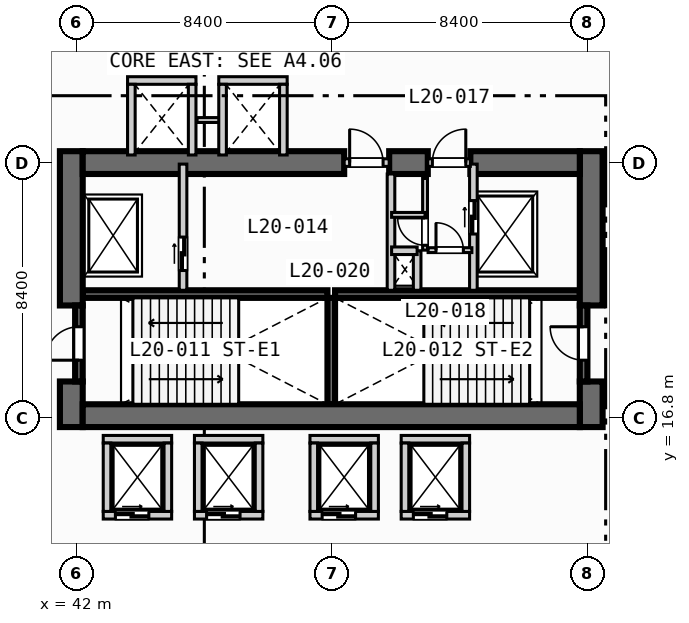
"""IFC4 building model, lengths in metres.
Left out: names, types, materials, properties, quantities, classifications, styles, units other than length and angle.
Written with IfcOpenShell. Run it as: python <this file> out.ifc"""

import sys

from ifc_helpers import new_model, si_unit, direction, frame, frame_2d, origin, place, context, subcontext, project, spatial, rectangle, extrude, element, fill, save


model = new_model("IFC4")
c1 = context("Model", 3, precision=1e-05, world=origin(), true_north=direction((0.0, 1.0)))
c2 = subcontext(c1, "Body", "Model", "MODEL_VIEW")
j1 = project(units=[si_unit("LENGTHUNIT", "METRE"), si_unit("PLANEANGLEUNIT", "RADIAN")], contexts=[c1])
p1 = place(None, origin())
s1 = spatial("IfcSite", under=j1, at=p1, CompositionType="ELEMENT")
p2 = place(p1, origin())
s2 = spatial("IfcBuilding", under=s1, at=p2, CompositionType="ELEMENT")
p3 = place(p2, frame((0.0, 0.0, 85.2)))
s3 = spatial("IfcBuildingStorey", under=s2, at=p3, CompositionType="ELEMENT", Elevation=85.2)
for number, where, z_axis, x_axis in (
    (1, (42.2, 20.875, 0.0), (0.0, 0.0, 1.0), (1.0, 0.0, 0.0)),
    (2, (50.5, 20.875, 0.0), (0.0, 0.0, 1.0), (1.0, 0.0, 0.0)),
):
    element("IfcWall", number, at=place(p3, frame(where, z_axis=z_axis, x_axis=x_axis)), inside=s3, PredefinedType="SOLIDWALL", context=c2, shape_type="SweptSolid", body=[
        extrude(rectangle(XDim=8.05, YDim=0.25, at=frame_2d((4.025, 0.0))), origin(), (0.0, 0.0, 1.0), 4.15),
    ])
p4 = place(p3, frame((50.375, 17.25, 0.0), z_axis=(0.0, 0.0, 1.0), x_axis=(0.0, 1.0, 0.0)))
e3 = element("IfcWall", 3, at=p4, inside=s3, PredefinedType="SOLIDWALL", context=c2, shape_type="SweptSolid", body=[
    extrude(rectangle(XDim=3.5, YDim=0.25, at=frame_2d((1.75, 0.0))), origin(), (0.0, 0.0, 1.0), 4.15),
])
p5 = place(p3, frame((41.825, 16.5, 0.0), z_axis=(0.0, 0.0, 1.0), x_axis=(0.0, 1.0, 0.0)))
e4 = element("IfcWall", 4, at=p5, inside=s3, PredefinedType="SHEAR", context=c2, shape_type="SweptSolid", body=[
    extrude(rectangle(XDim=1.5, YDim=0.75, at=frame_2d((0.75, 0.0))), origin(), (0.0, 0.0, 1.0), 4.15),
])
p6 = place(p3, frame((41.825, 20.5, 0.0), z_axis=(0.0, 0.0, 1.0), x_axis=(0.0, 1.0, 0.0)))
e5 = element("IfcWall", 5, at=p6, inside=s3, PredefinedType="SHEAR", context=c2, shape_type="SweptSolid", body=[
    extrude(rectangle(XDim=5.075, YDim=0.75, at=frame_2d((2.538, 0.0))), origin(), (0.0, 0.0, 1.0), 4.15),
])
p7 = place(p3, frame((58.925, 16.5, 0.0), z_axis=(0.0, 0.0, 1.0), x_axis=(0.0, 1.0, 0.0)))
e6 = element("IfcWall", 6, at=p7, inside=s3, PredefinedType="SHEAR", context=c2, shape_type="SweptSolid", body=[
    extrude(rectangle(XDim=1.5, YDim=0.75, at=frame_2d((0.75, 0.0))), origin(), (0.0, 0.0, 1.0), 4.15),
])
p8 = place(p3, frame((58.925, 20.5, 0.0), z_axis=(0.0, 0.0, 1.0), x_axis=(0.0, 1.0, 0.0)))
e7 = element("IfcWall", 7, at=p8, inside=s3, PredefinedType="SHEAR", context=c2, shape_type="SweptSolid", body=[
    extrude(rectangle(XDim=5.075, YDim=0.75, at=frame_2d((2.538, 0.0))), origin(), (0.0, 0.0, 1.0), 4.15),
])
p9 = place(p3, frame((42.2, 16.875, 0.0), z_axis=(0.0, 0.0, 1.0), x_axis=(1.0, 0.0, 0.0)))
e8 = element("IfcWall", 8, at=p9, inside=s3, PredefinedType="SHEAR", context=c2, shape_type="SweptSolid", body=[
    extrude(rectangle(XDim=16.35, YDim=0.75, at=frame_2d((8.175, 0.0))), origin(), (0.0, 0.0, 1.0), 4.15),
])
p10 = place(p3, frame((42.2, 25.2, 0.0), z_axis=(0.0, 0.0, 1.0), x_axis=(1.0, 0.0, 0.0)))
e9 = element("IfcWall", 9, at=p10, inside=s3, PredefinedType="SHEAR", context=c2, shape_type="SweptSolid", body=[
    extrude(rectangle(XDim=8.6, YDim=0.75, at=frame_2d((4.3, 0.0))), origin(), (0.0, 0.0, 1.0), 4.15),
])
p11 = place(p3, frame((52.28, 25.2, 0.0), z_axis=(0.0, 0.0, 1.0), x_axis=(1.0, 0.0, 0.0)))
e10 = element("IfcWall", 10, at=p11, inside=s3, PredefinedType="SHEAR", context=c2, shape_type="SweptSolid", body=[
    extrude(rectangle(XDim=1.27, YDim=0.75, at=frame_2d((0.635, 0.0))), origin(), (0.0, 0.0, 1.0), 4.15),
])
p12 = place(p3, frame((54.95, 25.2, 0.0), z_axis=(0.0, 0.0, 1.0), x_axis=(1.0, 0.0, 0.0)))
e11 = element("IfcWall", 11, at=p12, inside=s3, PredefinedType="SHEAR", context=c2, shape_type="SweptSolid", body=[
    extrude(rectangle(XDim=3.6, YDim=0.75, at=frame_2d((1.8, 0.0))), origin(), (0.0, 0.0, 1.0), 4.15),
])
p13 = place(p3, frame((42.075, 18.0, 0.0), z_axis=(0.0, 0.0, 1.0), x_axis=(0.0, 1.0, 0.0)))
e12 = element("IfcWall", 12, at=p13, inside=s3, PredefinedType="SOLIDWALL", context=c2, shape_type="SweptSolid", body=[
    extrude(rectangle(XDim=2.5, YDim=0.25, at=frame_2d((1.25, 0.0))), origin(), (0.0, 0.0, 1.0), 4.15),
])
p14 = place(p13, frame((0.7, 0.0, 0.0)))
e13 = element("IfcOpeningElement", 13, at=p14, cuts=e12, PredefinedType="OPENING", context=c2, shape_type="SweptSolid", body=[
    extrude(rectangle(XDim=1.1, YDim=2.15, at=frame_2d((0.55, 1.075))), frame((0.0, 0.135, 0.0), z_axis=(0.0, -1.0, 0.0), x_axis=(1.0, 0.0, 0.0)), (0.0, 0.0, 1.0), 0.27),
])
p15 = place(p3, frame((58.675, 18.0, 0.0), z_axis=(0.0, 0.0, 1.0), x_axis=(0.0, 1.0, 0.0)))
e14 = element("IfcWall", 14, at=p15, inside=s3, PredefinedType="SOLIDWALL", context=c2, shape_type="SweptSolid", body=[
    extrude(rectangle(XDim=2.5, YDim=0.25, at=frame_2d((1.25, 0.0))), origin(), (0.0, 0.0, 1.0), 4.15),
])
p16 = place(p15, frame((0.7, 0.0, 0.0)))
e15 = element("IfcOpeningElement", 15, at=p16, cuts=e14, PredefinedType="OPENING", context=c2, shape_type="SweptSolid", body=[
    extrude(rectangle(XDim=1.1, YDim=2.15, at=frame_2d((0.55, 1.075))), frame((0.0, 0.135, 0.0), z_axis=(0.0, -1.0, 0.0), x_axis=(1.0, 0.0, 0.0)), (0.0, 0.0, 1.0), 0.27),
])
p17 = place(p3, frame((45.5, 21.0, 0.0), z_axis=(0.0, 0.0, 1.0), x_axis=(0.0, 1.0, 0.0)))
e16 = element("IfcWall", 16, at=p17, inside=s3, PredefinedType="SOLIDWALL", context=c2, shape_type="SweptSolid", body=[
    extrude(rectangle(XDim=4.15, YDim=0.25, at=frame_2d((2.075, 0.0))), origin(), (0.0, 0.0, 1.0), 4.15),
])
p18 = place(p17, frame((0.65, 0.0, 0.0)))
e17 = element("IfcOpeningElement", 17, at=p18, cuts=e16, PredefinedType="OPENING", context=c2, shape_type="SweptSolid", body=[
    extrude(rectangle(XDim=1.1, YDim=2.15, at=frame_2d((0.55, 1.075))), frame((0.0, 0.135, 0.0), z_axis=(0.0, -1.0, 0.0), x_axis=(1.0, 0.0, 0.0)), (0.0, 0.0, 1.0), 0.27),
])
p19 = place(p3, frame((50.8, 25.2, 0.0), z_axis=(0.0, 0.0, 1.0), x_axis=(1.0, 0.0, 0.0)))
e18 = element("IfcWall", 18, at=p19, inside=s3, PredefinedType="SOLIDWALL", context=c2, shape_type="SweptSolid", body=[
    extrude(rectangle(XDim=1.48, YDim=0.25, at=frame_2d((0.74, 0.0))), origin(), (0.0, 0.0, 1.0), 4.15),
])
p20 = place(p19, frame((0.18, 0.0, 0.0)))
e19 = element("IfcOpeningElement", 19, at=p20, cuts=e18, PredefinedType="OPENING", context=c2, shape_type="SweptSolid", body=[
    extrude(rectangle(XDim=1.1, YDim=2.15, at=frame_2d((0.55, 1.075))), frame((0.0, 0.135, 0.0), z_axis=(0.0, -1.0, 0.0), x_axis=(1.0, 0.0, 0.0)), (0.0, 0.0, 1.0), 0.27),
])
p21 = place(p3, frame((52.34, 21.0, 0.0), z_axis=(0.0, 0.0, 1.0), x_axis=(0.0, 1.0, 0.0)))
e20 = element("IfcWall", 20, at=p21, inside=s3, PredefinedType="SOLIDWALL", context=c2, shape_type="SweptSolid", body=[
    extrude(rectangle(XDim=3.825, YDim=0.25, at=frame_2d((1.913, 0.0))), origin(), (0.0, 0.0, 1.0), 4.15),
])
p22 = place(p3, frame((55.05, 21.0, 0.0), z_axis=(0.0, 0.0, 1.0), x_axis=(0.0, 1.0, 0.0)))
e21 = element("IfcWall", 21, at=p22, inside=s3, PredefinedType="SOLIDWALL", context=c2, shape_type="SweptSolid", body=[
    extrude(rectangle(XDim=4.15, YDim=0.25, at=frame_2d((2.075, 0.0))), origin(), (0.0, 0.0, 1.0), 4.15),
])
p23 = place(p22, frame((1.85, 0.0, 0.0)))
e22 = element("IfcOpeningElement", 22, at=p23, cuts=e21, PredefinedType="OPENING", context=c2, shape_type="SweptSolid", body=[
    extrude(rectangle(XDim=1.1, YDim=2.15, at=frame_2d((0.55, 1.075))), frame((0.0, 0.135, 0.0), z_axis=(0.0, -1.0, 0.0), x_axis=(1.0, 0.0, 0.0)), (0.0, 0.0, 1.0), 0.27),
])
p24 = place(p3, frame((53.55, 25.2, 0.0), z_axis=(0.0, 0.0, 1.0), x_axis=(1.0, 0.0, 0.0)))
e23 = element("IfcWall", 23, at=p24, inside=s3, PredefinedType="SOLIDWALL", context=c2, shape_type="SweptSolid", body=[
    extrude(rectangle(XDim=1.4, YDim=0.25, at=frame_2d((0.7, 0.0))), origin(), (0.0, 0.0, 1.0), 4.15),
])
p25 = place(p24, frame((0.15, 0.0, 0.0)))
e24 = element("IfcOpeningElement", 24, at=p25, cuts=e23, PredefinedType="OPENING", context=c2, shape_type="SweptSolid", body=[
    extrude(rectangle(XDim=1.1, YDim=2.15, at=frame_2d((0.55, 1.075))), frame((0.0, 0.135, 0.0), z_axis=(0.0, -1.0, 0.0), x_axis=(1.0, 0.0, 0.0)), (0.0, 0.0, 1.0), 0.27),
])
p26 = place(p3, frame((53.2, 21.0, 0.0), z_axis=(0.0, 0.0, 1.0), x_axis=(0.0, 1.0, 0.0)))
e25 = element("IfcWall", 25, at=p26, inside=s3, PredefinedType="SOLIDWALL", context=c2, shape_type="SweptSolid", body=[
    extrude(rectangle(XDim=1.3, YDim=0.25, at=frame_2d((0.65, 0.0))), origin(), (0.0, 0.0, 1.0), 4.15),
])
p27 = place(p3, frame((52.36, 22.3, 0.0), z_axis=(0.0, 0.0, 1.0), x_axis=(1.0, 0.0, 0.0)))
e26 = element("IfcWall", 26, at=p27, inside=s3, PredefinedType="SOLIDWALL", context=c2, shape_type="SweptSolid", body=[
    extrude(rectangle(XDim=0.84, YDim=0.25, at=frame_2d((0.42, 0.0))), origin(), (0.0, 0.0, 1.0), 4.15),
])
p28 = place(p3, frame((53.56, 22.32, 0.0), z_axis=(0.0, 0.0, 1.0), x_axis=(1.0, 0.0, 0.0)))
e27 = element("IfcWall", 27, at=p28, inside=s3, PredefinedType="PARTITIONING", context=c2, shape_type="SweptSolid", body=[
    extrude(rectangle(XDim=1.44, YDim=0.16, at=frame_2d((0.72, 0.0))), origin(), (0.0, 0.0, 1.0), 4.15),
])
p29 = place(p28, frame((0.26, 0.0, 0.0)))
e28 = element("IfcOpeningElement", 28, at=p29, cuts=e27, PredefinedType="OPENING", context=c2, shape_type="SweptSolid", body=[
    extrude(rectangle(XDim=0.9, YDim=2.1, at=frame_2d((0.45, 1.05))), frame((0.0, 0.09, 0.0), z_axis=(0.0, -1.0, 0.0), x_axis=(1.0, 0.0, 0.0)), (0.0, 0.0, 1.0), 0.18),
])
p30 = place(p3, frame((53.46, 22.32, 0.0), z_axis=(0.0, 0.0, 1.0), x_axis=(0.0, 1.0, 0.0)))
e29 = element("IfcWall", 29, at=p30, inside=s3, PredefinedType="PARTITIONING", context=c2, shape_type="SweptSolid", body=[
    extrude(rectangle(XDim=2.36, YDim=0.16, at=frame_2d((1.18, 0.0))), origin(), (0.0, 0.0, 1.0), 4.15),
])
p31 = place(p30, frame((0.16, 0.0, 0.0)))
e30 = element("IfcOpeningElement", 30, at=p31, cuts=e29, PredefinedType="OPENING", context=c2, shape_type="SweptSolid", body=[
    extrude(rectangle(XDim=0.9, YDim=2.1, at=frame_2d((0.45, 1.05))), frame((0.0, 0.09, 0.0), z_axis=(0.0, -1.0, 0.0), x_axis=(1.0, 0.0, 0.0)), (0.0, 0.0, 1.0), 0.18),
])
p32 = place(p3, frame((52.36, 23.48, 0.0), z_axis=(0.0, 0.0, 1.0), x_axis=(1.0, 0.0, 0.0)))
e31 = element("IfcWall", 31, at=p32, inside=s3, PredefinedType="PARTITIONING", context=c2, shape_type="SweptSolid", body=[
    extrude(rectangle(XDim=1.1, YDim=0.16, at=frame_2d((0.55, 0.0))), origin(), (0.0, 0.0, 1.0), 4.15),
])
p33 = place(p3, frame((42.875, 13.6, 0.0), z_axis=(0.0, 0.0, 1.0), x_axis=(1.0, 0.0, 0.0)))
e32 = element("IfcWall", 32, at=p33, inside=s3, PredefinedType="SOLIDWALL", context=c2, shape_type="SweptSolid", body=[
    extrude(rectangle(XDim=2.25, YDim=0.25, at=frame_2d((1.125, 0.0))), origin(), (0.0, 0.0, 1.0), 4.15),
])
p34 = place(p33, frame((0.4, 0.0, 0.0)))
e33 = element("IfcOpeningElement", 33, at=p34, cuts=e32, PredefinedType="OPENING", context=c2, shape_type="SweptSolid", body=[
    extrude(rectangle(XDim=1.1, YDim=2.15, at=frame_2d((0.55, 1.075))), frame((0.0, 0.135, 0.0), z_axis=(0.0, -1.0, 0.0), x_axis=(1.0, 0.0, 0.0)), (0.0, 0.0, 1.0), 0.27),
])
for number, where, z_axis, x_axis in (
    (34, (42.875, 16.1, 0.0), (0.0, 0.0, 1.0), (1.0, 0.0, 0.0)),
    (35, (43.0, 13.725, 0.0), (0.0, 0.0, 1.0), (0.0, 1.0, 0.0)),
    (36, (45.0, 13.725, 0.0), (0.0, 0.0, 1.0), (0.0, 1.0, 0.0)),
):
    element("IfcWall", number, at=place(p3, frame(where, z_axis=z_axis, x_axis=x_axis)), inside=s3, PredefinedType="SOLIDWALL", context=c2, shape_type="SweptSolid", body=[
        extrude(rectangle(XDim=2.25, YDim=0.25, at=frame_2d((1.125, 0.0))), origin(), (0.0, 0.0, 1.0), 4.15),
    ])
p35 = place(p3, frame((45.875, 13.6, 0.0), z_axis=(0.0, 0.0, 1.0), x_axis=(1.0, 0.0, 0.0)))
e37 = element("IfcWall", 37, at=p35, inside=s3, PredefinedType="SOLIDWALL", context=c2, shape_type="SweptSolid", body=[
    extrude(rectangle(XDim=2.25, YDim=0.25, at=frame_2d((1.125, 0.0))), origin(), (0.0, 0.0, 1.0), 4.15),
])
p36 = place(p35, frame((0.4, 0.0, 0.0)))
e38 = element("IfcOpeningElement", 38, at=p36, cuts=e37, PredefinedType="OPENING", context=c2, shape_type="SweptSolid", body=[
    extrude(rectangle(XDim=1.1, YDim=2.15, at=frame_2d((0.55, 1.075))), frame((0.0, 0.135, 0.0), z_axis=(0.0, -1.0, 0.0), x_axis=(1.0, 0.0, 0.0)), (0.0, 0.0, 1.0), 0.27),
])
for number, where, z_axis, x_axis in (
    (39, (45.875, 16.1, 0.0), (0.0, 0.0, 1.0), (1.0, 0.0, 0.0)),
    (40, (46.0, 13.725, 0.0), (0.0, 0.0, 1.0), (0.0, 1.0, 0.0)),
    (41, (48.0, 13.725, 0.0), (0.0, 0.0, 1.0), (0.0, 1.0, 0.0)),
):
    element("IfcWall", number, at=place(p3, frame(where, z_axis=z_axis, x_axis=x_axis)), inside=s3, PredefinedType="SOLIDWALL", context=c2, shape_type="SweptSolid", body=[
        extrude(rectangle(XDim=2.25, YDim=0.25, at=frame_2d((1.125, 0.0))), origin(), (0.0, 0.0, 1.0), 4.15),
    ])
p37 = place(p3, frame((49.675, 13.6, 0.0), z_axis=(0.0, 0.0, 1.0), x_axis=(1.0, 0.0, 0.0)))
e42 = element("IfcWall", 42, at=p37, inside=s3, PredefinedType="SOLIDWALL", context=c2, shape_type="SweptSolid", body=[
    extrude(rectangle(XDim=2.25, YDim=0.25, at=frame_2d((1.125, 0.0))), origin(), (0.0, 0.0, 1.0), 4.15),
])
p38 = place(p37, frame((0.4, 0.0, 0.0)))
e43 = element("IfcOpeningElement", 43, at=p38, cuts=e42, PredefinedType="OPENING", context=c2, shape_type="SweptSolid", body=[
    extrude(rectangle(XDim=1.1, YDim=2.15, at=frame_2d((0.55, 1.075))), frame((0.0, 0.135, 0.0), z_axis=(0.0, -1.0, 0.0), x_axis=(1.0, 0.0, 0.0)), (0.0, 0.0, 1.0), 0.27),
])
for number, where, z_axis, x_axis in (
    (44, (49.675, 16.1, 0.0), (0.0, 0.0, 1.0), (1.0, 0.0, 0.0)),
    (45, (49.8, 13.725, 0.0), (0.0, 0.0, 1.0), (0.0, 1.0, 0.0)),
    (46, (51.8, 13.725, 0.0), (0.0, 0.0, 1.0), (0.0, 1.0, 0.0)),
):
    element("IfcWall", number, at=place(p3, frame(where, z_axis=z_axis, x_axis=x_axis)), inside=s3, PredefinedType="SOLIDWALL", context=c2, shape_type="SweptSolid", body=[
        extrude(rectangle(XDim=2.25, YDim=0.25, at=frame_2d((1.125, 0.0))), origin(), (0.0, 0.0, 1.0), 4.15),
    ])
p39 = place(p3, frame((52.675, 13.6, 0.0), z_axis=(0.0, 0.0, 1.0), x_axis=(1.0, 0.0, 0.0)))
e47 = element("IfcWall", 47, at=p39, inside=s3, PredefinedType="SOLIDWALL", context=c2, shape_type="SweptSolid", body=[
    extrude(rectangle(XDim=2.25, YDim=0.25, at=frame_2d((1.125, 0.0))), origin(), (0.0, 0.0, 1.0), 4.15),
])
p40 = place(p39, frame((0.4, 0.0, 0.0)))
e48 = element("IfcOpeningElement", 48, at=p40, cuts=e47, PredefinedType="OPENING", context=c2, shape_type="SweptSolid", body=[
    extrude(rectangle(XDim=1.1, YDim=2.15, at=frame_2d((0.55, 1.075))), frame((0.0, 0.135, 0.0), z_axis=(0.0, -1.0, 0.0), x_axis=(1.0, 0.0, 0.0)), (0.0, 0.0, 1.0), 0.27),
])
for number, where, z_axis, x_axis in (
    (49, (52.675, 16.1, 0.0), (0.0, 0.0, 1.0), (1.0, 0.0, 0.0)),
    (50, (52.8, 13.725, 0.0), (0.0, 0.0, 1.0), (0.0, 1.0, 0.0)),
    (51, (54.8, 13.725, 0.0), (0.0, 0.0, 1.0), (0.0, 1.0, 0.0)),
    (52, (43.675, 27.9, 0.0), (0.0, 0.0, 1.0), (1.0, 0.0, 0.0)),
):
    element("IfcWall", number, at=place(p3, frame(where, z_axis=z_axis, x_axis=x_axis)), inside=s3, PredefinedType="SOLIDWALL", context=c2, shape_type="SweptSolid", body=[
        extrude(rectangle(XDim=2.25, YDim=0.25, at=frame_2d((1.125, 0.0))), origin(), (0.0, 0.0, 1.0), 4.15),
    ])
for number, where, z_axis, x_axis in (
    (53, (43.8, 25.45, 0.0), (0.0, 0.0, 1.0), (0.0, 1.0, 0.0)),
    (54, (45.8, 25.45, 0.0), (0.0, 0.0, 1.0), (0.0, 1.0, 0.0)),
):
    element("IfcWall", number, at=place(p3, frame(where, z_axis=z_axis, x_axis=x_axis)), inside=s3, PredefinedType="SOLIDWALL", context=c2, shape_type="SweptSolid", body=[
        extrude(rectangle(XDim=2.325, YDim=0.25, at=frame_2d((1.163, 0.0))), origin(), (0.0, 0.0, 1.0), 4.15),
    ])
p41 = place(p3, frame((45.96, 26.6, 0.0), z_axis=(0.0, 0.0, 1.0), x_axis=(1.0, 0.0, 0.0)))
e55 = element("IfcWall", 55, at=p41, inside=s3, PredefinedType="PARTITIONING", context=c2, shape_type="SweptSolid", body=[
    extrude(rectangle(XDim=0.88, YDim=0.16, at=frame_2d((0.44, 0.0))), origin(), (0.0, 0.0, 1.0), 4.15),
])
p42 = place(p3, frame((46.675, 27.9, 0.0), z_axis=(0.0, 0.0, 1.0), x_axis=(1.0, 0.0, 0.0)))
e56 = element("IfcWall", 56, at=p42, inside=s3, PredefinedType="SOLIDWALL", context=c2, shape_type="SweptSolid", body=[
    extrude(rectangle(XDim=2.25, YDim=0.25, at=frame_2d((1.125, 0.0))), origin(), (0.0, 0.0, 1.0), 4.15),
])
for number, where, z_axis, x_axis in (
    (57, (46.8, 25.45, 0.0), (0.0, 0.0, 1.0), (0.0, 1.0, 0.0)),
    (58, (48.8, 25.45, 0.0), (0.0, 0.0, 1.0), (0.0, 1.0, 0.0)),
):
    element("IfcWall", number, at=place(p3, frame(where, z_axis=z_axis, x_axis=x_axis)), inside=s3, PredefinedType="SOLIDWALL", context=c2, shape_type="SweptSolid", body=[
        extrude(rectangle(XDim=2.325, YDim=0.25, at=frame_2d((1.163, 0.0))), origin(), (0.0, 0.0, 1.0), 4.15),
    ])
p43 = place(p14, origin())
e59 = element("IfcDoor", 59, at=p43, inside=s3, OperationType="SINGLE_SWING_LEFT", PredefinedType="DOOR", context=c2, shape_type="SweptSolid", body=[
    extrude(rectangle(XDim=1.1, YDim=2.15, at=frame_2d((0.55, 1.075))), frame((0.0, 0.025, 0.0), z_axis=(0.0, -1.0, 0.0), x_axis=(1.0, 0.0, 0.0)), (0.0, 0.0, 1.0), 0.05),
])
fill(e13, e59)
p44 = place(p16, origin())
e60 = element("IfcDoor", 60, at=p44, inside=s3, OperationType="SINGLE_SWING_RIGHT", PredefinedType="DOOR", context=c2, shape_type="SweptSolid", body=[
    extrude(rectangle(XDim=1.1, YDim=2.15, at=frame_2d((0.55, 1.075))), frame((0.0, 0.025, 0.0), z_axis=(0.0, -1.0, 0.0), x_axis=(1.0, 0.0, 0.0)), (0.0, 0.0, 1.0), 0.05),
])
fill(e15, e60)
p45 = place(p18, origin())
e61 = element("IfcDoor", 61, at=p45, inside=s3, OperationType="SLIDING_TO_LEFT", PredefinedType="DOOR", context=c2, shape_type="SweptSolid", body=[
    extrude(rectangle(XDim=1.1, YDim=2.15, at=frame_2d((0.55, 1.075))), frame((0.0, 0.025, 0.0), z_axis=(0.0, -1.0, 0.0), x_axis=(1.0, 0.0, 0.0)), (0.0, 0.0, 1.0), 0.05),
])
fill(e17, e61)
p46 = place(p20, origin())
e62 = element("IfcDoor", 62, at=p46, inside=s3, OperationType="SINGLE_SWING_LEFT", PredefinedType="DOOR", context=c2, shape_type="SweptSolid", body=[
    extrude(rectangle(XDim=1.1, YDim=2.15, at=frame_2d((0.55, 1.075))), frame((0.0, 0.025, 0.0), z_axis=(0.0, -1.0, 0.0), x_axis=(1.0, 0.0, 0.0)), (0.0, 0.0, 1.0), 0.05),
])
fill(e19, e62)
p47 = place(p23, origin())
e63 = element("IfcDoor", 63, at=p47, inside=s3, OperationType="SLIDING_TO_LEFT", PredefinedType="DOOR", context=c2, shape_type="SweptSolid", body=[
    extrude(rectangle(XDim=1.1, YDim=2.15, at=frame_2d((0.55, 1.075))), frame((0.0, 0.025, 0.0), z_axis=(0.0, -1.0, 0.0), x_axis=(1.0, 0.0, 0.0)), (0.0, 0.0, 1.0), 0.05),
])
fill(e22, e63)
p48 = place(p25, origin())
e64 = element("IfcDoor", 64, at=p48, inside=s3, OperationType="SINGLE_SWING_RIGHT", PredefinedType="DOOR", context=c2, shape_type="SweptSolid", body=[
    extrude(rectangle(XDim=1.1, YDim=2.15, at=frame_2d((0.55, 1.075))), frame((0.0, 0.025, 0.0), z_axis=(0.0, -1.0, 0.0), x_axis=(1.0, 0.0, 0.0)), (0.0, 0.0, 1.0), 0.05),
])
fill(e24, e64)
p49 = place(p29, origin())
e65 = element("IfcDoor", 65, at=p49, inside=s3, OperationType="SINGLE_SWING_LEFT", PredefinedType="DOOR", context=c2, shape_type="SweptSolid", body=[
    extrude(rectangle(XDim=0.9, YDim=2.1, at=frame_2d((0.45, 1.05))), frame((0.0, 0.025, 0.0), z_axis=(0.0, -1.0, 0.0), x_axis=(1.0, 0.0, 0.0)), (0.0, 0.0, 1.0), 0.05),
])
fill(e28, e65)
p50 = place(p31, origin())
e66 = element("IfcDoor", 66, at=p50, inside=s3, OperationType="SINGLE_SWING_RIGHT", PredefinedType="DOOR", context=c2, shape_type="SweptSolid", body=[
    extrude(rectangle(XDim=0.9, YDim=2.1, at=frame_2d((0.45, 1.05))), frame((0.0, 0.025, 0.0), z_axis=(0.0, -1.0, 0.0), x_axis=(1.0, 0.0, 0.0)), (0.0, 0.0, 1.0), 0.05),
])
fill(e30, e66)
p51 = place(p34, origin())
e67 = element("IfcDoor", 67, at=p51, inside=s3, OperationType="SLIDING_TO_LEFT", PredefinedType="DOOR", context=c2, shape_type="SweptSolid", body=[
    extrude(rectangle(XDim=1.1, YDim=2.15, at=frame_2d((0.55, 1.075))), frame((0.0, 0.025, 0.0), z_axis=(0.0, -1.0, 0.0), x_axis=(1.0, 0.0, 0.0)), (0.0, 0.0, 1.0), 0.05),
])
fill(e33, e67)
p52 = place(p36, origin())
e68 = element("IfcDoor", 68, at=p52, inside=s3, OperationType="SLIDING_TO_LEFT", PredefinedType="DOOR", context=c2, shape_type="SweptSolid", body=[
    extrude(rectangle(XDim=1.1, YDim=2.15, at=frame_2d((0.55, 1.075))), frame((0.0, 0.025, 0.0), z_axis=(0.0, -1.0, 0.0), x_axis=(1.0, 0.0, 0.0)), (0.0, 0.0, 1.0), 0.05),
])
fill(e38, e68)
p53 = place(p38, origin())
e69 = element("IfcDoor", 69, at=p53, inside=s3, OperationType="SLIDING_TO_LEFT", PredefinedType="DOOR", context=c2, shape_type="SweptSolid", body=[
    extrude(rectangle(XDim=1.1, YDim=2.15, at=frame_2d((0.55, 1.075))), frame((0.0, 0.025, 0.0), z_axis=(0.0, -1.0, 0.0), x_axis=(1.0, 0.0, 0.0)), (0.0, 0.0, 1.0), 0.05),
])
fill(e43, e69)
p54 = place(p40, origin())
e70 = element("IfcDoor", 70, at=p54, inside=s3, OperationType="SLIDING_TO_LEFT", PredefinedType="DOOR", context=c2, shape_type="SweptSolid", body=[
    extrude(rectangle(XDim=1.1, YDim=2.15, at=frame_2d((0.55, 1.075))), frame((0.0, 0.025, 0.0), z_axis=(0.0, -1.0, 0.0), x_axis=(1.0, 0.0, 0.0)), (0.0, 0.0, 1.0), 0.05),
])
fill(e48, e70)
save(model, sys.argv[1])
